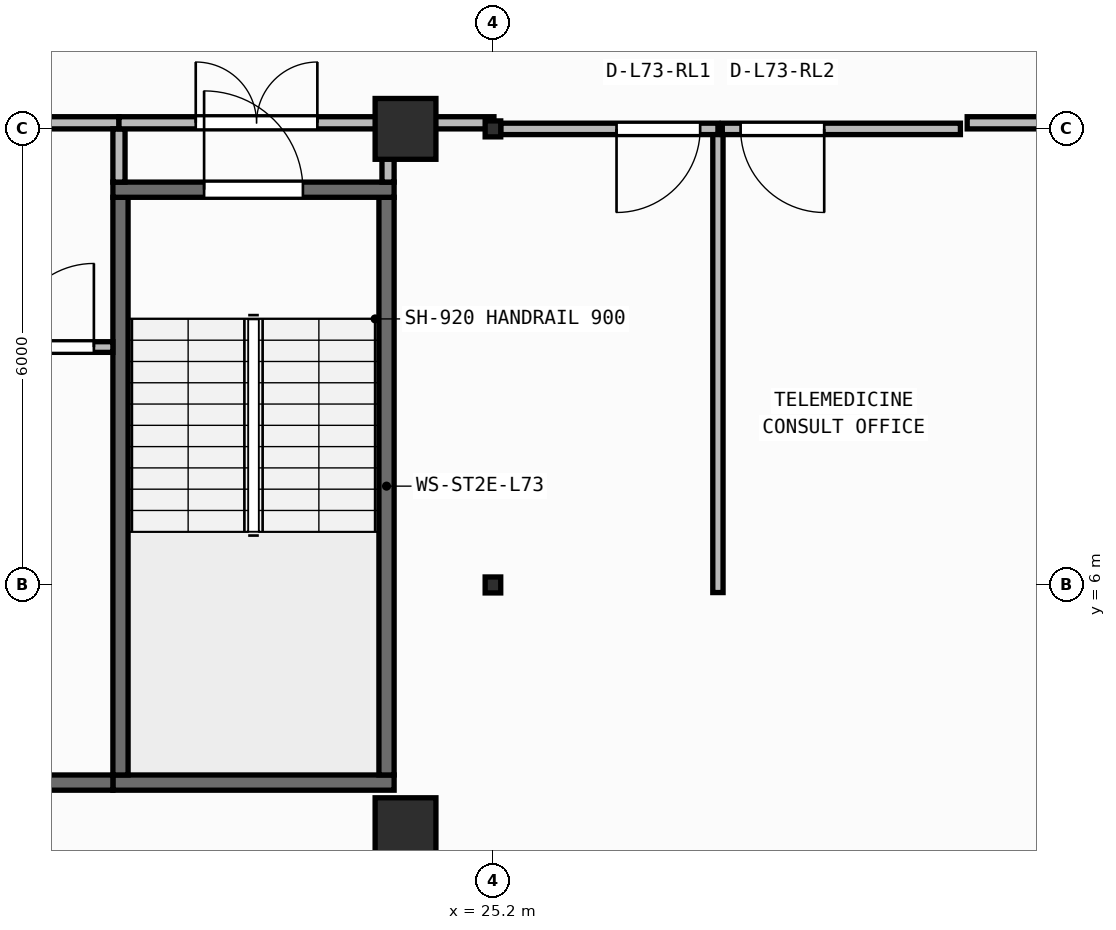
"""IFC4 building model, lengths in metres.
Left out: names, types, materials, properties, quantities, classifications, styles, units other than length and angle.
Written with IfcOpenShell. Run it as: python <this file> out.ifc"""

import sys

from ifc_helpers import new_model, si_unit, direction, frame, frame_2d, origin, origin_2d, place, context, subcontext, project, spatial, rectangle, i_section, extrude, element, fill, save


model = new_model("IFC4")
c1 = context("Model", 3, precision=1e-05, world=origin(), true_north=direction((0.0, 1.0)))
c2 = subcontext(c1, "Body", "Model", "MODEL_VIEW")
j1 = project(units=[si_unit("LENGTHUNIT", "METRE"), si_unit("PLANEANGLEUNIT", "RADIAN")], contexts=[c1])
p1 = place(None, origin())
s1 = spatial("IfcSite", under=j1, at=p1, CompositionType="ELEMENT")
p2 = place(p1, origin())
s2 = spatial("IfcBuilding", under=s1, at=p2, CompositionType="ELEMENT")
p3 = place(p2, frame((0.0, 0.0, 296.05)))
s3 = spatial("IfcBuildingStorey", under=s2, at=p3, CompositionType="ELEMENT", Elevation=296.05)
p4 = place(p3, frame((24.05, 2.8, 0.0), z_axis=(0.0, 0.0, 1.0), x_axis=(1.0, 0.0, 0.0)))
e1 = element("IfcColumn", 1, at=p4, inside=s3, PredefinedType="COLUMN", context=c2, shape_type="SweptSolid", body=[
    extrude(rectangle(XDim=0.8, YDim=0.8, at=origin_2d()), origin(), (0.0, 0.0, 1.0), 3.95),
])
p5 = place(p3, frame((25.2, 6.0, 0.0), z_axis=(0.0, 0.0, 1.0), x_axis=(1.0, 0.0, 0.0)))
e2 = element("IfcColumn", 2, at=p5, inside=s3, PredefinedType="COLUMN", context=c2, shape_type="SweptSolid", body=[
    extrude(i_section(OverallWidth=0.205, OverallDepth=0.21, WebThickness=0.009, FlangeThickness=0.014, FilletRadius=0.011, at=origin_2d()), origin(), (0.0, 0.0, 1.0), 3.95),
])
p6 = place(p3, frame((24.05, 12.0, 0.0), z_axis=(0.0, 0.0, 1.0), x_axis=(1.0, 0.0, 0.0)))
e3 = element("IfcColumn", 3, at=p6, inside=s3, PredefinedType="COLUMN", context=c2, shape_type="SweptSolid", body=[
    extrude(rectangle(XDim=0.8, YDim=0.8, at=origin_2d()), origin(), (0.0, 0.0, 1.0), 3.95),
])
p7 = place(p3, frame((25.2, 12.0, 0.0), z_axis=(0.0, 0.0, 1.0), x_axis=(1.0, 0.0, 0.0)))
e4 = element("IfcColumn", 4, at=p7, inside=s3, PredefinedType="COLUMN", context=c2, shape_type="SweptSolid", body=[
    extrude(i_section(OverallWidth=0.205, OverallDepth=0.21, WebThickness=0.009, FlangeThickness=0.014, FilletRadius=0.011, at=origin_2d()), origin(), (0.0, 0.0, 1.0), 3.95),
])
p8 = place(p3, frame((2.46, 0.171, 0.0), z_axis=(0.0, 0.0, 1.0), x_axis=(0.997760665813, 0.066885377746, 0.0)))
e5 = element("IfcWall", 5, at=p8, inside=s3, PredefinedType="STANDARD", context=c2, shape_type="SweptSolid", body=[
    extrude(rectangle(XDim=35.56, YDim=0.26, at=frame_2d((17.78, 0.0))), origin(), (0.0, 0.0, 1.0), 3.71),
])
p9 = place(p8, frame((16.58, 0.0, 0.9)))
e6 = element("IfcOpeningElement", 6, at=p9, cuts=e5, PredefinedType="OPENING", context=c2, shape_type="SweptSolid", body=[
    extrude(rectangle(XDim=2.4, YDim=1.65, at=frame_2d((1.2, 0.825))), frame((0.0, 0.14, 0.0), z_axis=(0.0, -1.0, 0.0), x_axis=(1.0, 0.0, 0.0)), (0.0, 0.0, 1.0), 0.28),
])
p10 = place(p3, frame((20.2, 3.4, 0.0), z_axis=(0.0, 0.0, 1.0), x_axis=(1.0, 0.0, 0.0)))
e7 = element("IfcWall", 7, at=p10, inside=s3, PredefinedType="SHEAR", context=c2, shape_type="SweptSolid", body=[
    extrude(rectangle(XDim=3.7, YDim=0.2, at=frame_2d((1.85, 0.0))), origin(), (0.0, 0.0, 1.0), 3.71),
])
for number, where, z_axis, x_axis in (
    (8, (20.3, 3.5, 0.0), (0.0, 0.0, 1.0), (0.0, 1.0, 0.0)),
    (9, (23.8, 3.5, 0.0), (0.0, 0.0, 1.0), (0.0, 1.0, 0.0)),
):
    element("IfcWall", number, at=place(p3, frame(where, z_axis=z_axis, x_axis=x_axis)), inside=s3, PredefinedType="SHEAR", context=c2, shape_type="SweptSolid", body=[
        extrude(rectangle(XDim=7.6, YDim=0.2, at=frame_2d((3.8, 0.0))), origin(), (0.0, 0.0, 1.0), 3.71),
    ])
p11 = place(p3, frame((20.2, 11.2, 0.0), z_axis=(0.0, 0.0, 1.0), x_axis=(1.0, 0.0, 0.0)))
e10 = element("IfcWall", 10, at=p11, inside=s3, PredefinedType="SHEAR", context=c2, shape_type="SweptSolid", body=[
    extrude(rectangle(XDim=3.7, YDim=0.2, at=frame_2d((1.85, 0.0))), origin(), (0.0, 0.0, 1.0), 3.71),
])
p12 = place(p11, frame((1.2, 0.0, 0.0)))
e11 = element("IfcOpeningElement", 11, at=p12, cuts=e10, PredefinedType="OPENING", context=c2, shape_type="SweptSolid", body=[
    extrude(rectangle(XDim=1.3, YDim=2.15, at=frame_2d((0.65, 1.075))), frame((0.0, 0.11, 0.0), z_axis=(0.0, -1.0, 0.0), x_axis=(1.0, 0.0, 0.0)), (0.0, 0.0, 1.0), 0.22),
])
p13 = place(p3, frame((6.5, 3.4, 0.0), z_axis=(0.0, 0.0, 1.0), x_axis=(1.0, 0.0, 0.0)))
e12 = element("IfcWall", 12, at=p13, inside=s3, PredefinedType="SHEAR", context=c2, shape_type="SweptSolid", body=[
    extrude(rectangle(XDim=13.7, YDim=0.2, at=frame_2d((6.85, 0.0))), origin(), (0.0, 0.0, 1.0), 3.71),
])
p14 = place(p3, frame((18.61, 9.13, 0.0), z_axis=(0.0, 0.0, 1.0), x_axis=(1.0, 0.0, 0.0)))
e13 = element("IfcWall", 13, at=p14, inside=s3, PredefinedType="PARTITIONING", context=c2, shape_type="SweptSolid", body=[
    extrude(rectangle(XDim=1.59, YDim=0.14, at=frame_2d((0.795, 0.0))), origin(), (0.0, 0.0, 1.0), 3.71),
])
p15 = place(p14, frame((0.24, 0.0, 0.0)))
e14 = element("IfcOpeningElement", 14, at=p15, cuts=e13, PredefinedType="OPENING", context=c2, shape_type="SweptSolid", body=[
    extrude(rectangle(XDim=1.1, YDim=2.1, at=frame_2d((0.55, 1.05))), frame((0.0, 0.08, 0.0), z_axis=(0.0, -1.0, 0.0), x_axis=(1.0, 0.0, 0.0)), (0.0, 0.0, 1.0), 0.16),
])
p16 = place(p3, frame((12.58, 12.08, 0.0), z_axis=(0.0, 0.0, 1.0), x_axis=(1.0, 0.0, 0.0)))
e15 = element("IfcWall", 15, at=p16, inside=s3, PredefinedType="PARTITIONING", context=c2, shape_type="SweptSolid", body=[
    extrude(rectangle(XDim=7.7, YDim=0.16, at=frame_2d((3.85, 0.0))), origin(), (0.0, 0.0, 1.0), 3.157),
])
p17 = place(p16, frame((3.05, 0.0, 0.0)))
e16 = element("IfcOpeningElement", 16, at=p17, cuts=e15, PredefinedType="OPENING", context=c2, shape_type="SweptSolid", body=[
    extrude(rectangle(XDim=1.6, YDim=2.05, at=frame_2d((0.8, 1.025))), frame((0.0, 0.09, 0.0), z_axis=(0.0, -1.0, 0.0), x_axis=(1.0, 0.0, 0.0)), (0.0, 0.0, 1.0), 0.18),
])
p18 = place(p3, frame((20.28, 11.3, 0.0), z_axis=(0.0, 0.0, 1.0), x_axis=(0.0, 1.0, 0.0)))
e17 = element("IfcWall", 17, at=p18, inside=s3, PredefinedType="PARTITIONING", context=c2, shape_type="SweptSolid", body=[
    extrude(rectangle(XDim=0.7, YDim=0.16, at=frame_2d((0.35, 0.0))), origin(), (0.0, 0.0, 1.0), 3.71),
])
p19 = place(p3, frame((20.28, 12.08, 0.0), z_axis=(0.0, 0.0, 1.0), x_axis=(1.0, 0.0, 0.0)))
e18 = element("IfcWall", 18, at=p19, inside=s3, PredefinedType="PARTITIONING", context=c2, shape_type="SweptSolid", body=[
    extrude(rectangle(XDim=3.62, YDim=0.16, at=frame_2d((1.81, 0.0))), origin(), (0.0, 0.0, 1.0), 3.157),
])
p20 = place(p19, frame((1.01, 0.0, 0.0)))
e19 = element("IfcOpeningElement", 19, at=p20, cuts=e18, PredefinedType="OPENING", context=c2, shape_type="SweptSolid", body=[
    extrude(rectangle(XDim=1.6, YDim=2.05, at=frame_2d((0.8, 1.025))), frame((0.0, 0.09, 0.0), z_axis=(0.0, -1.0, 0.0), x_axis=(1.0, 0.0, 0.0)), (0.0, 0.0, 1.0), 0.18),
])
p21 = place(p3, frame((23.82, 11.3, 0.0), z_axis=(0.0, 0.0, 1.0), x_axis=(0.0, 1.0, 0.0)))
e20 = element("IfcWall", 20, at=p21, inside=s3, PredefinedType="PARTITIONING", context=c2, shape_type="SweptSolid", body=[
    extrude(rectangle(XDim=0.7, YDim=0.16, at=frame_2d((0.35, 0.0))), origin(), (0.0, 0.0, 1.0), 3.71),
])
p22 = place(p3, frame((28.16, 5.9, 0.0), z_axis=(0.0, 0.0, 1.0), x_axis=(0.0, 1.0, 0.0)))
e21 = element("IfcWall", 21, at=p22, inside=s3, PredefinedType="PARTITIONING", context=c2, shape_type="SweptSolid", body=[
    extrude(rectangle(XDim=6.1, YDim=0.135, at=frame_2d((3.05, 0.0))), origin(), (0.0, 0.0, 1.0), 3.71),
])
p23 = place(p3, frame((28.16, 12.0, 0.0), z_axis=(0.0, 0.0, 1.0), x_axis=(-1.0, 0.0, 0.0)))
e22 = element("IfcWall", 22, at=p23, inside=s3, PredefinedType="PARTITIONING", context=c2, shape_type="SweptSolid", body=[
    extrude(rectangle(XDim=2.857, YDim=0.15, at=frame_2d((1.429, 0.0))), origin(), (0.0, 0.0, 1.0), 3.157),
])
p24 = place(p23, frame((0.234, 0.0, 0.0)))
e23 = element("IfcOpeningElement", 23, at=p24, cuts=e22, PredefinedType="OPENING", context=c2, shape_type="SweptSolid", body=[
    extrude(rectangle(XDim=1.1, YDim=2.1, at=frame_2d((0.55, 1.05))), frame((0.0, 0.085, 0.0), z_axis=(0.0, -1.0, 0.0), x_axis=(1.0, 0.0, 0.0)), (0.0, 0.0, 1.0), 0.17),
])
p25 = place(p3, frame((31.35, 12.0, 0.0), z_axis=(0.0, 0.0, 1.0), x_axis=(-1.0, 0.0, 0.0)))
e24 = element("IfcWall", 24, at=p25, inside=s3, PredefinedType="PARTITIONING", context=c2, shape_type="SweptSolid", body=[
    extrude(rectangle(XDim=3.133, YDim=0.15, at=frame_2d((1.566, 0.0))), origin(), (0.0, 0.0, 1.0), 3.157),
])
p26 = place(p25, frame((1.792, 0.0, 0.0)))
e25 = element("IfcOpeningElement", 25, at=p26, cuts=e24, PredefinedType="OPENING", context=c2, shape_type="SweptSolid", body=[
    extrude(rectangle(XDim=1.1, YDim=2.1, at=frame_2d((0.55, 1.05))), frame((0.0, 0.085, 0.0), z_axis=(0.0, -1.0, 0.0), x_axis=(1.0, 0.0, 0.0)), (0.0, 0.0, 1.0), 0.17),
])
p27 = place(p3, frame((24.02, 12.08, 0.0), z_axis=(0.0, 0.0, 1.0), x_axis=(1.0, 0.0, 0.0)))
e26 = element("IfcWall", 26, at=p27, inside=s3, PredefinedType="PARTITIONING", context=c2, shape_type="SweptSolid", body=[
    extrude(rectangle(XDim=1.193, YDim=0.16, at=frame_2d((0.597, 0.0))), origin(), (0.0, 0.0, 1.0), 3.157),
])
p28 = place(p3, frame((31.439, 12.08, 0.0), z_axis=(0.0, 0.0, 1.0), x_axis=(1.0, 0.0, 0.0)))
e27 = element("IfcWall", 27, at=p28, inside=s3, PredefinedType="PARTITIONING", context=c2, shape_type="SweptSolid", body=[
    extrude(rectangle(XDim=2.174, YDim=0.16, at=frame_2d((1.087, 0.0))), origin(), (0.0, 0.0, 1.0), 3.157),
])
p29 = place(p12, origin())
e28 = element("IfcDoor", 28, at=p29, inside=s3, OperationType="SINGLE_SWING_LEFT", PredefinedType="DOOR", context=c2, shape_type="SweptSolid", body=[
    extrude(rectangle(XDim=1.3, YDim=2.15, at=frame_2d((0.65, 1.075))), frame((0.0, 0.025, 0.0), z_axis=(0.0, -1.0, 0.0), x_axis=(1.0, 0.0, 0.0)), (0.0, 0.0, 1.0), 0.05),
])
fill(e11, e28)
p30 = place(p15, origin())
e29 = element("IfcDoor", 29, at=p30, inside=s3, OperationType="SINGLE_SWING_RIGHT", PredefinedType="DOOR", context=c2, shape_type="SweptSolid", body=[
    extrude(rectangle(XDim=1.1, YDim=2.1, at=frame_2d((0.55, 1.05))), frame((0.0, 0.025, 0.0), z_axis=(0.0, -1.0, 0.0), x_axis=(1.0, 0.0, 0.0)), (0.0, 0.0, 1.0), 0.05),
])
fill(e14, e29)
p31 = place(p20, origin())
e30 = element("IfcDoor", 30, at=p31, inside=s3, OperationType="DOUBLE_DOOR_SINGLE_SWING", PredefinedType="DOOR", context=c2, shape_type="SweptSolid", body=[
    extrude(rectangle(XDim=1.6, YDim=2.05, at=frame_2d((0.8, 1.025))), frame((0.0, 0.025, 0.0), z_axis=(0.0, -1.0, 0.0), x_axis=(1.0, 0.0, 0.0)), (0.0, 0.0, 1.0), 0.05),
])
fill(e19, e30)
p32 = place(p24, origin())
e31 = element("IfcDoor", 31, at=p32, inside=s3, OperationType="SINGLE_SWING_RIGHT", PredefinedType="DOOR", context=c2, shape_type="SweptSolid", body=[
    extrude(rectangle(XDim=1.1, YDim=2.1, at=frame_2d((0.55, 1.05))), frame((0.0, 0.025, 0.0), z_axis=(0.0, -1.0, 0.0), x_axis=(1.0, 0.0, 0.0)), (0.0, 0.0, 1.0), 0.05),
])
fill(e23, e31)
p33 = place(p26, origin())
e32 = element("IfcDoor", 32, at=p33, inside=s3, OperationType="SINGLE_SWING_LEFT", PredefinedType="DOOR", context=c2, shape_type="SweptSolid", body=[
    extrude(rectangle(XDim=1.1, YDim=2.1, at=frame_2d((0.55, 1.05))), frame((0.0, 0.025, 0.0), z_axis=(0.0, -1.0, 0.0), x_axis=(1.0, 0.0, 0.0)), (0.0, 0.0, 1.0), 0.05),
])
fill(e25, e32)
save(model, sys.argv[1])
